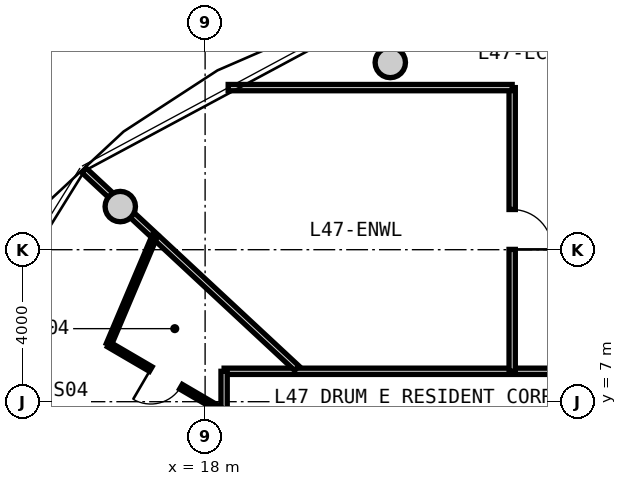
"""IFC4 building model, lengths in metres.
Left out: names, types, materials, properties, quantities, classifications, styles, units other than length and angle.
Written with IfcOpenShell. Run it as: python <this file> out.ifc"""

import sys

from ifc_helpers import new_model, si_unit, direction, frame, frame_2d, origin, origin_2d, place, context, subcontext, project, spatial, rectangle, circle, extrude, source, transform, mapped, element, fill, save


model = new_model("IFC4")
c1 = context("Model", 3, precision=1e-05, world=origin(), true_north=direction((0.0, 1.0)))
c2 = subcontext(c1, "Body", "Model", "MODEL_VIEW")
j1 = project(units=[si_unit("LENGTHUNIT", "METRE"), si_unit("PLANEANGLEUNIT", "RADIAN")], contexts=[c1])
p1 = place(None, origin())
s1 = spatial("IfcSite", under=j1, at=p1, CompositionType="ELEMENT")
p2 = place(p1, origin())
s2 = spatial("IfcBuilding", under=s1, at=p2, CompositionType="ELEMENT")
p3 = place(p2, frame((0.0, 0.0, 152.6)))
s3 = spatial("IfcBuildingStorey", under=s2, at=p3, CompositionType="ELEMENT", Elevation=152.6)
m1 = source(origin(), c2, "Body", "SweptSolid", [
    extrude(circle(Radius=0.4, at=origin_2d()), origin(), (0.0, 0.0, 1.0), 3.05),
])
for number, where, z_axis, x_axis in (
    (1, (22.873, 15.926, 0.0), (0.0, 0.0, 1.0), (1.0, 0.0, 0.0)),
    (2, (15.767, 12.135, 0.0), (0.0, 0.0, 1.0), (1.0, 0.0, 0.0)),
):
    element("IfcColumn", number, at=place(p3, frame(where, z_axis=z_axis, x_axis=x_axis)), inside=s3, PredefinedType="COLUMN", context=c2, shape_type="MappedRepresentation", body=[
        mapped(m1, transform((0.0, 0.0, 0.0), x_axis=(1.0, 0.0, 0.0), y_axis=(0.0, 1.0, 0.0), z_axis=(0.0, 0.0, 1.0), scale=1.0)),
    ])
m2 = source(origin(), c2, "Body", "SweptSolid", [
    extrude(rectangle(XDim=8.6, YDim=0.165, at=frame_2d((4.3, 0.0))), origin(), (0.0, 0.0, 1.0), 2.795),
])
p4 = place(p3, frame((18.5, 7.8, 0.0), z_axis=(0.0, 0.0, 1.0), x_axis=(1.0, 0.0, 0.0)))
e3 = element("IfcWall", 3, at=p4, inside=s3, PredefinedType="PARTITIONING", context=c2, shape_type="MappedRepresentation", body=[
    mapped(m2, transform((0.0, 0.0, 0.0), x_axis=(1.0, 0.0, 0.0), y_axis=(0.0, 1.0, 0.0), z_axis=(0.0, 0.0, 1.0), scale=1.0)),
])
m3 = source(origin(), c2, "Body", "SweptSolid", [
    extrude(rectangle(XDim=15.6, YDim=0.165, at=frame_2d((7.8, 0.0))), origin(), (0.0, 0.0, 1.0), 2.795),
])
p5 = place(p3, frame((18.5, -7.8, 0.0), z_axis=(0.0, 0.0, 1.0), x_axis=(0.0, 1.0, 0.0)))
e4 = element("IfcWall", 4, at=p5, inside=s3, PredefinedType="PARTITIONING", context=c2, shape_type="MappedRepresentation", body=[
    mapped(m3, transform((0.0, 0.0, 0.0), x_axis=(1.0, 0.0, 0.0), y_axis=(0.0, 1.0, 0.0), z_axis=(0.0, 0.0, 1.0), scale=1.0)),
])
p6 = place(p5, frame((12.591, 0.0, 0.0)))
e5 = element("IfcOpeningElement", 5, at=p6, cuts=e4, PredefinedType="OPENING", context=c2, shape_type="SweptSolid", body=[
    extrude(rectangle(XDim=1.05, YDim=2.15, at=frame_2d((0.525, 1.075))), frame((0.0, 0.093, 0.0), z_axis=(0.0, -1.0, 0.0), x_axis=(1.0, 0.0, 0.0)), (0.0, 0.0, 1.0), 0.185),
])
p7 = place(p5, frame((8.081, 0.0, 0.0)))
e6 = element("IfcOpeningElement", 6, at=p7, cuts=e4, PredefinedType="OPENING", context=c2, shape_type="SweptSolid", body=[
    extrude(rectangle(XDim=1.05, YDim=2.15, at=frame_2d((0.525, 1.075))), frame((0.0, 0.093, 0.0), z_axis=(0.0, -1.0, 0.0), x_axis=(1.0, 0.0, 0.0)), (0.0, 0.0, 1.0), 0.185),
])
p8 = place(p5, frame((2.854, 0.0, 0.0)))
e7 = element("IfcOpeningElement", 7, at=p8, cuts=e4, PredefinedType="OPENING", context=c2, shape_type="SweptSolid", body=[
    extrude(rectangle(XDim=1.05, YDim=2.15, at=frame_2d((0.525, 1.075))), frame((0.0, 0.093, 0.0), z_axis=(0.0, -1.0, 0.0), x_axis=(1.0, 0.0, 0.0)), (0.0, 0.0, 1.0), 0.185),
])
p9 = place(p5, frame((0.452, 0.0, 0.0)))
e8 = element("IfcOpeningElement", 8, at=p9, cuts=e4, PredefinedType="OPENING", context=c2, shape_type="SweptSolid", body=[
    extrude(rectangle(XDim=0.92, YDim=2.1, at=frame_2d((0.46, 1.05))), frame((0.0, 0.093, 0.0), z_axis=(0.0, -1.0, 0.0), x_axis=(1.0, 0.0, 0.0)), (0.0, 0.0, 1.0), 0.185),
])
m4 = source(origin(), c2, "Body", "SweptSolid", [
    extrude(rectangle(XDim=7.648, YDim=0.165, at=frame_2d((3.824, 0.0))), origin(), (0.0, 0.0, 1.0), 2.345),
])
p10 = place(p3, frame((20.413, 7.88, 0.0), z_axis=(0.0, 0.0, 1.0), x_axis=(-0.732182665826, 0.681108320213, 0.0)))
e9 = element("IfcWall", 9, at=p10, inside=s3, PredefinedType="PARTITIONING", context=c2, shape_type="MappedRepresentation", body=[
    mapped(m4, transform((0.0, 0.0, 0.0), x_axis=(1.0, 0.0, 0.0), y_axis=(0.0, 1.0, 0.0), z_axis=(0.0, 0.0, 1.0), scale=1.0)),
])
m5 = source(origin(), c2, "Body", "SweptSolid", [
    extrude(rectangle(XDim=7.465, YDim=0.165, at=frame_2d((3.733, 0.0))), origin(), (0.0, 0.0, 1.0), 2.795),
])
p11 = place(p3, frame((26.08, 7.8, 0.0), z_axis=(0.0, 0.0, 1.0), x_axis=(0.0, 1.0, 0.0)))
e10 = element("IfcWall", 10, at=p11, inside=s3, PredefinedType="PARTITIONING", context=c2, shape_type="MappedRepresentation", body=[
    mapped(m5, transform((0.0, 0.0, 0.0), x_axis=(1.0, 0.0, 0.0), y_axis=(0.0, 1.0, 0.0), z_axis=(0.0, 0.0, 1.0), scale=1.0)),
])
p12 = place(p11, frame((3.208, 0.0, 0.0)))
e11 = element("IfcOpeningElement", 11, at=p12, cuts=e10, PredefinedType="OPENING", context=c2, shape_type="SweptSolid", body=[
    extrude(rectangle(XDim=1.05, YDim=2.15, at=frame_2d((0.525, 1.075))), frame((0.0, 0.093, 0.0), z_axis=(0.0, -1.0, 0.0), x_axis=(1.0, 0.0, 0.0)), (0.0, 0.0, 1.0), 0.185),
])
m6 = source(origin(), c2, "Body", "SweptSolid", [
    extrude(rectangle(XDim=7.473, YDim=0.165, at=frame_2d((3.737, 0.0))), origin(), (0.0, 0.0, 1.0), 2.795),
])
p13 = place(p3, frame((18.607, 15.265, 0.0), z_axis=(0.0, 0.0, 1.0), x_axis=(1.0, 0.0, 0.0)))
e12 = element("IfcWall", 12, at=p13, inside=s3, PredefinedType="PARTITIONING", context=c2, shape_type="MappedRepresentation", body=[
    mapped(m6, transform((0.0, 0.0, 0.0), x_axis=(1.0, 0.0, 0.0), y_axis=(0.0, 1.0, 0.0), z_axis=(0.0, 0.0, 1.0), scale=1.0)),
])
m7 = source(origin(), c2, "Body", "SweptSolid", [
    extrude(rectangle(XDim=3.481, YDim=0.14, at=frame_2d((1.74, 0.0))), origin(), (0.0, 0.0, 1.0), 2.795),
])
p14 = place(p3, frame((18.47, 6.748, 0.0), z_axis=(0.0, 0.0, 1.0), x_axis=(-0.863310428788, 0.504673264148, 0.0)))
e13 = element("IfcWall", 13, at=p14, inside=s3, PredefinedType="PARTITIONING", context=c2, shape_type="MappedRepresentation", body=[
    mapped(m7, transform((0.0, 0.0, 0.0), x_axis=(1.0, 0.0, 0.0), y_axis=(0.0, 1.0, 0.0), z_axis=(0.0, 0.0, 1.0), scale=1.0)),
])
p15 = place(p14, frame((1.28, 0.0, 0.0)))
e14 = element("IfcOpeningElement", 14, at=p15, cuts=e13, PredefinedType="OPENING", context=c2, shape_type="SweptSolid", body=[
    extrude(rectangle(XDim=0.92, YDim=2.1, at=frame_2d((0.46, 1.05))), frame((0.0, 0.08, 0.0), z_axis=(0.0, -1.0, 0.0), x_axis=(1.0, 0.0, 0.0)), (0.0, 0.0, 1.0), 0.16),
])
m8 = source(origin(), c2, "Body", "SweptSolid", [
    extrude(rectangle(XDim=3.142, YDim=0.14, at=frame_2d((1.571, 0.0))), origin(), (0.0, 0.0, 1.0), 2.795),
])
p16 = place(p3, frame((15.465, 8.504, 0.0), z_axis=(0.0, 0.0, 1.0), x_axis=(0.389855410514, 0.920876082268, 0.0)))
e15 = element("IfcWall", 15, at=p16, inside=s3, PredefinedType="PARTITIONING", context=c2, shape_type="MappedRepresentation", body=[
    mapped(m8, transform((0.0, 0.0, 0.0), x_axis=(1.0, 0.0, 0.0), y_axis=(0.0, 1.0, 0.0), z_axis=(0.0, 0.0, 1.0), scale=1.0)),
])
m9 = source(origin(), c2, "Body", "SweptSolid", [
    extrude(rectangle(XDim=1.05, YDim=2.15, at=frame_2d((0.525, 1.075))), frame((0.0, 0.025, 0.0), z_axis=(0.0, -1.0, 0.0), x_axis=(1.0, 0.0, 0.0)), (0.0, 0.0, 1.0), 0.05),
])
p17 = place(p12, frame((1.05, 0.0, 0.0), z_axis=(0.0, 0.0, 1.0), x_axis=(-1.0, 0.0, 0.0)))
e16 = element("IfcDoor", 16, at=p17, inside=s3, OperationType="SINGLE_SWING_RIGHT", PredefinedType="DOOR", context=c2, shape_type="MappedRepresentation", body=[
    mapped(m9, transform((0.0, 0.0, 0.0), x_axis=(1.0, 0.0, 0.0), y_axis=(0.0, 1.0, 0.0), z_axis=(0.0, 0.0, 1.0), scale=1.0)),
])
fill(e11, e16)
m10 = source(origin(), c2, "Body", "SweptSolid", [
    extrude(rectangle(XDim=0.92, YDim=2.1, at=frame_2d((0.46, 1.05))), frame((0.0, 0.025, 0.0), z_axis=(0.0, -1.0, 0.0), x_axis=(1.0, 0.0, 0.0)), (0.0, 0.0, 1.0), 0.05),
])
p18 = place(p15, origin())
e17 = element("IfcDoor", 17, at=p18, inside=s3, OperationType="SINGLE_SWING_RIGHT", PredefinedType="DOOR", context=c2, shape_type="MappedRepresentation", body=[
    mapped(m10, transform((0.0, 0.0, 0.0), x_axis=(1.0, 0.0, 0.0), y_axis=(0.0, 1.0, 0.0), z_axis=(0.0, 0.0, 1.0), scale=1.0)),
])
fill(e14, e17)
save(model, sys.argv[1])
